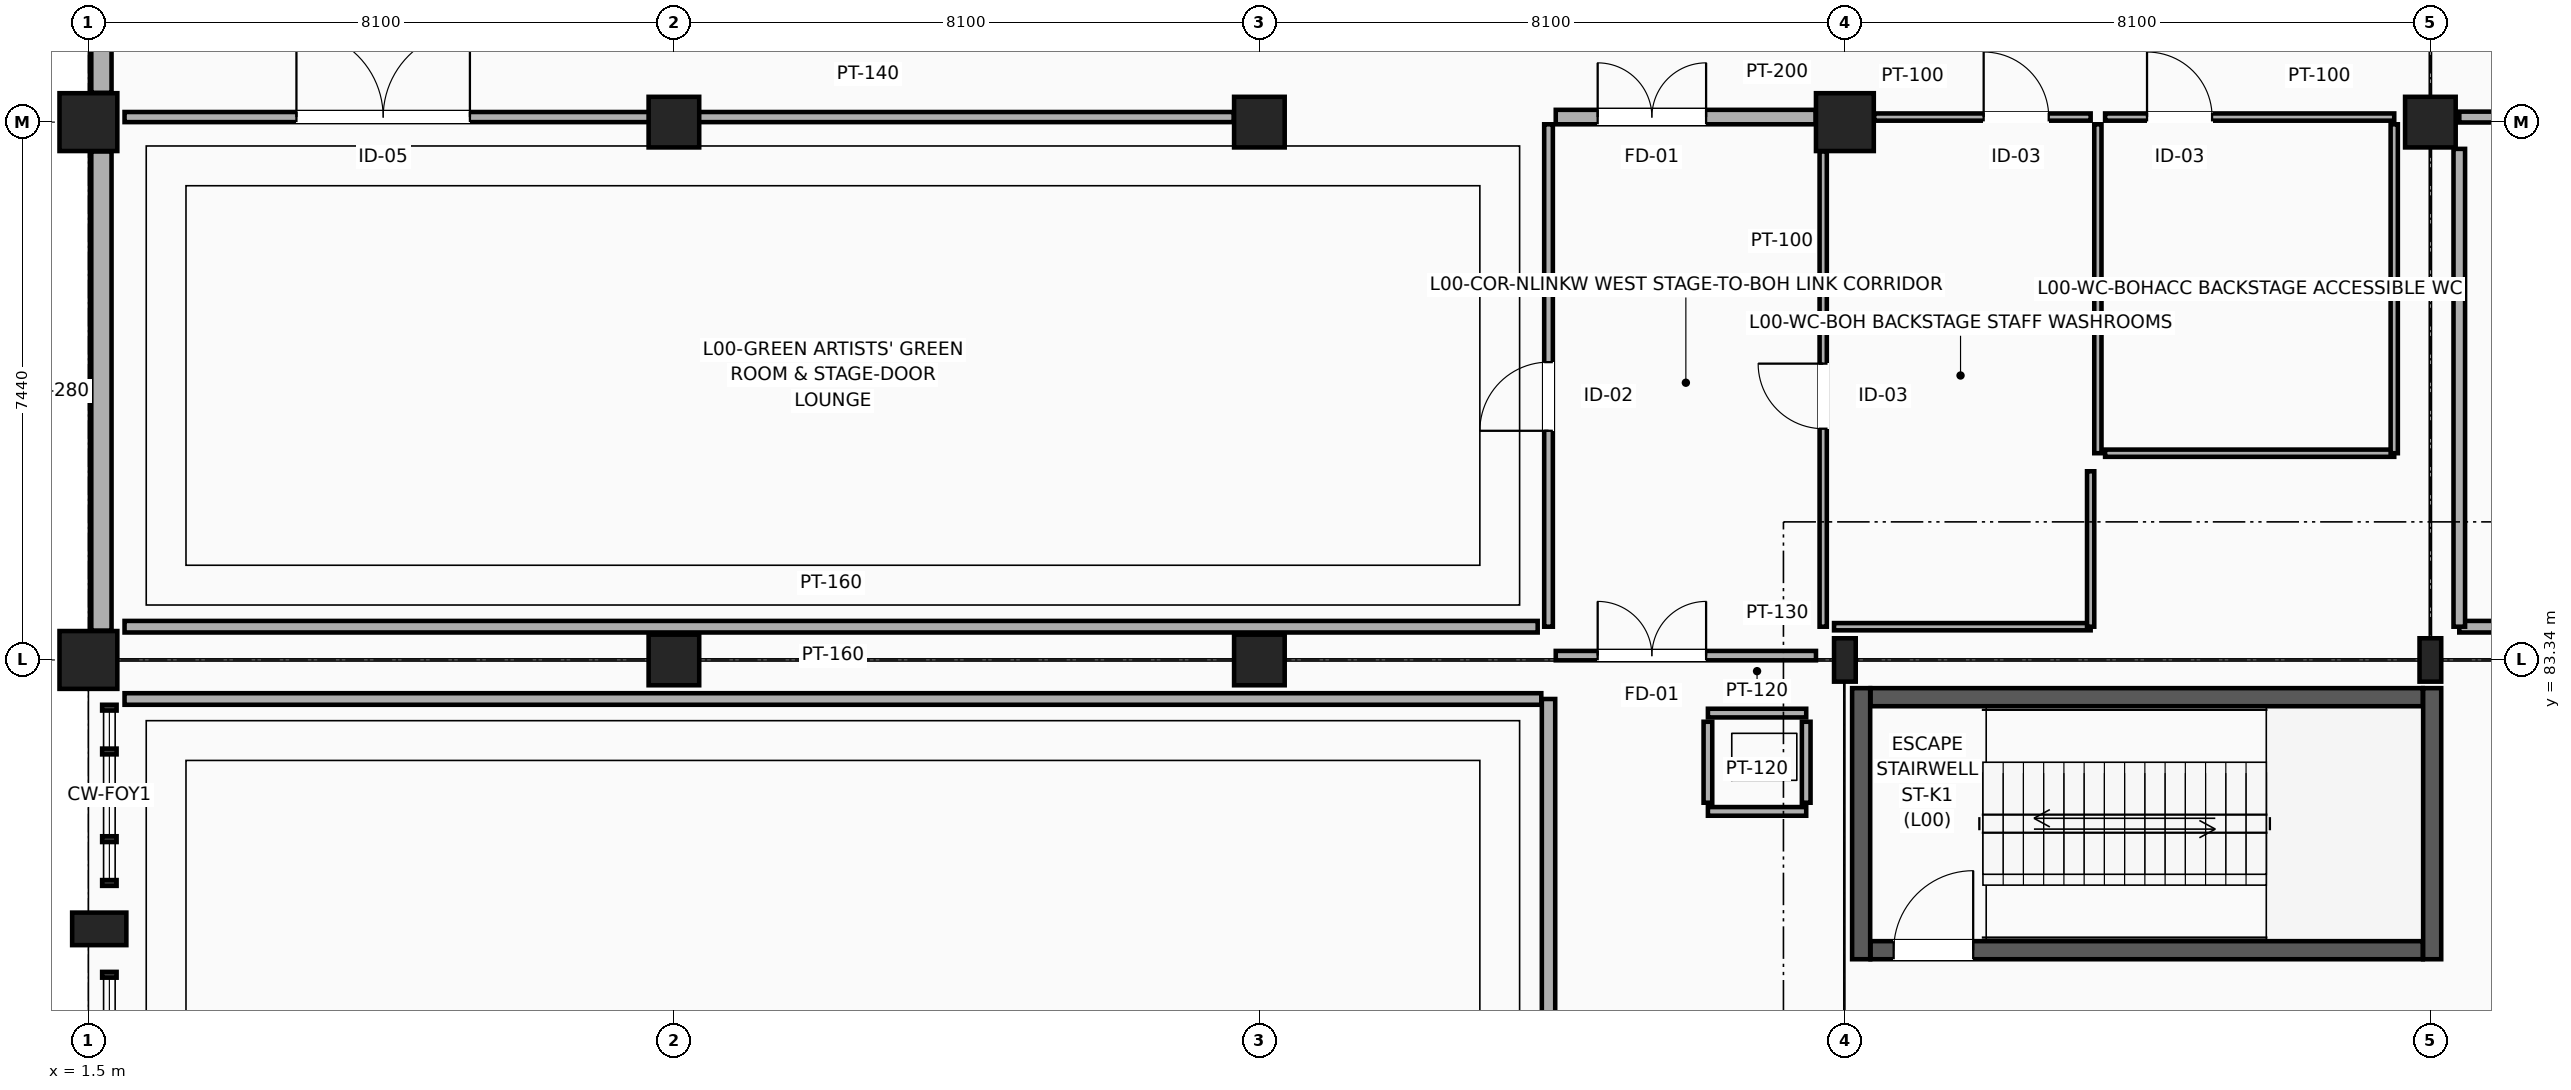
"""IFC4 building model, lengths in metres.
Left out: names, types, materials, properties, quantities, classifications, styles, units other than length and angle.
Written with IfcOpenShell. Run it as: python <this file> out.ifc"""

import sys

from ifc_helpers import new_model, si_unit, direction, frame, frame_2d, origin, origin_2d, place, context, subcontext, project, spatial, rectangle, i_section, extrude, element, fill, save


model = new_model("IFC4")
c1 = context("Model", 3, precision=1e-05, world=origin(), true_north=direction((0.0, 1.0)))
c2 = subcontext(c1, "Body", "Model", "MODEL_VIEW")
j1 = project(units=[si_unit("LENGTHUNIT", "METRE"), si_unit("PLANEANGLEUNIT", "RADIAN")], contexts=[c1])
p1 = place(None, origin())
s1 = spatial("IfcSite", under=j1, at=p1, CompositionType="ELEMENT")
p2 = place(p1, origin())
s2 = spatial("IfcBuilding", under=s1, at=p2, CompositionType="ELEMENT")
p3 = place(p2, origin())
s3 = spatial("IfcBuildingStorey", under=s2, at=p3, CompositionType="ELEMENT", Elevation=0.0)
p4 = place(p3, frame((1.65, 79.62, 0.0), z_axis=(0.0, 0.0, 1.0), x_axis=(0.0, 1.0, 0.0)))
e1 = element("IfcColumn", 1, at=p4, inside=s3, PredefinedType="PILASTER", context=c2, shape_type="SweptSolid", body=[
    extrude(rectangle(XDim=0.45, YDim=0.75, at=origin_2d()), origin(), (0.0, 0.0, 1.0), 5.4),
])
for number, where, z_axis, x_axis in (
    (2, (1.5, 83.34, 0.0), (0.0, 0.0, 1.0), (1.0, 0.0, 0.0)),
    (3, (1.5, 90.78, 0.0), (0.0, 0.0, 1.0), (1.0, 0.0, 0.0)),
):
    element("IfcColumn", number, at=place(p3, frame(where, z_axis=z_axis, x_axis=x_axis)), inside=s3, PredefinedType="COLUMN", context=c2, shape_type="SweptSolid", body=[
        extrude(rectangle(XDim=0.8, YDim=0.8, at=origin_2d()), origin(), (0.0, 0.0, 1.0), 5.4),
    ])
for number, where, z_axis, x_axis in (
    (4, (9.6, 83.34, 0.0), (0.0, 0.0, 1.0), (1.0, 0.0, 0.0)),
    (5, (9.6, 90.78, 0.0), (0.0, 0.0, 1.0), (1.0, 0.0, 0.0)),
    (6, (17.7, 83.34, 0.0), (0.0, 0.0, 1.0), (1.0, 0.0, 0.0)),
    (7, (17.7, 90.78, 0.0), (0.0, 0.0, 1.0), (1.0, 0.0, 0.0)),
):
    element("IfcColumn", number, at=place(p3, frame(where, z_axis=z_axis, x_axis=x_axis)), inside=s3, PredefinedType="COLUMN", context=c2, shape_type="SweptSolid", body=[
        extrude(rectangle(XDim=0.7, YDim=0.7, at=origin_2d()), origin(), (0.0, 0.0, 1.0), 5.4),
    ])
p5 = place(p3, frame((25.8, 83.34, 0.0), z_axis=(0.0, 0.0, 1.0), x_axis=(1.0, 0.0, 0.0)))
e8 = element("IfcColumn", 8, at=p5, inside=s3, PredefinedType="COLUMN", context=c2, shape_type="SweptSolid", body=[
    extrude(i_section(OverallWidth=0.3, OverallDepth=0.6, WebThickness=0.015, FlangeThickness=0.03, FilletRadius=0.027, at=origin_2d()), origin(), (0.0, 0.0, 1.0), 5.4),
])
p6 = place(p3, frame((25.8, 90.78, 0.0), z_axis=(0.0, 0.0, 1.0), x_axis=(1.0, 0.0, 0.0)))
e9 = element("IfcColumn", 9, at=p6, inside=s3, PredefinedType="COLUMN", context=c2, shape_type="SweptSolid", body=[
    extrude(rectangle(XDim=0.8, YDim=0.8, at=origin_2d()), origin(), (0.0, 0.0, 1.0), 5.4),
])
p7 = place(p3, frame((33.9, 83.34, 0.0), z_axis=(0.0, 0.0, 1.0), x_axis=(1.0, 0.0, 0.0)))
e10 = element("IfcColumn", 10, at=p7, inside=s3, PredefinedType="COLUMN", context=c2, shape_type="SweptSolid", body=[
    extrude(i_section(OverallWidth=0.3, OverallDepth=0.6, WebThickness=0.015, FlangeThickness=0.03, FilletRadius=0.027, at=origin_2d()), origin(), (0.0, 0.0, 1.0), 5.4),
])
p8 = place(p3, frame((33.9, 90.78, 0.0), z_axis=(0.0, 0.0, 1.0), x_axis=(1.0, 0.0, 0.0)))
e11 = element("IfcColumn", 11, at=p8, inside=s3, PredefinedType="COLUMN", context=c2, shape_type="SweptSolid", body=[
    extrude(rectangle(XDim=0.7, YDim=0.7, at=origin_2d()), origin(), (0.0, 0.0, 1.0), 5.4),
])
for number, where, z_axis, x_axis in (
    (12, (1.68, 83.745, 0.0), (0.0, 0.0, 1.0), (0.0, 1.0, 0.0)),
    (13, (1.68, 91.185, 0.0), (0.0, 0.0, 1.0), (0.0, 1.0, 0.0)),
):
    element("IfcWall", number, at=place(p3, frame(where, z_axis=z_axis, x_axis=x_axis)), inside=s3, PredefinedType="SOLIDWALL", context=c2, shape_type="SweptSolid", body=[
        extrude(rectangle(XDim=6.63, YDim=0.28, at=frame_2d((3.315, 0.0))), origin(), (0.0, 0.0, 1.0), 4.787),
    ])
p9 = place(p3, frame((26.155, 79.325, 0.0), z_axis=(0.0, 0.0, 1.0), x_axis=(1.0, 0.0, 0.0)))
e14 = element("IfcWall", 14, at=p9, inside=s3, PredefinedType="SHEAR", context=c2, shape_type="SweptSolid", body=[
    extrude(rectangle(XDim=7.64, YDim=0.25, at=frame_2d((3.82, 0.0))), origin(), (0.0, 0.0, 1.0), 5.105),
])
p10 = place(p9, frame((0.32, 0.0, 0.0)))
e15 = element("IfcOpeningElement", 15, at=p10, cuts=e14, PredefinedType="OPENING", context=c2, shape_type="SweptSolid", body=[
    extrude(rectangle(XDim=1.1, YDim=2.2, at=frame_2d((0.55, 1.1))), frame((0.0, 0.135, 0.0), z_axis=(0.0, -1.0, 0.0), x_axis=(1.0, 0.0, 0.0)), (0.0, 0.0, 1.0), 0.27),
])
p11 = place(p3, frame((26.155, 82.825, 0.0), z_axis=(0.0, 0.0, 1.0), x_axis=(1.0, 0.0, 0.0)))
e16 = element("IfcWall", 16, at=p11, inside=s3, PredefinedType="SHEAR", context=c2, shape_type="SweptSolid", body=[
    extrude(rectangle(XDim=7.64, YDim=0.25, at=frame_2d((3.82, 0.0))), origin(), (0.0, 0.0, 1.0), 5.105),
])
for number, where, z_axis, x_axis in (
    (17, (26.025, 79.2, 0.0), (0.0, 0.0, 1.0), (0.0, 1.0, 0.0)),
    (18, (33.925, 79.2, 0.0), (0.0, 0.0, 1.0), (0.0, 1.0, 0.0)),
):
    element("IfcWall", number, at=place(p3, frame(where, z_axis=z_axis, x_axis=x_axis)), inside=s3, PredefinedType="SHEAR", context=c2, shape_type="SweptSolid", body=[
        extrude(rectangle(XDim=3.75, YDim=0.25, at=frame_2d((1.875, 0.0))), origin(), (0.0, 0.0, 1.0), 5.105),
    ])
for number, where, z_axis, x_axis in (
    (19, (23.905, 81.245, 0.0), (0.0, 0.0, 1.0), (1.0, 0.0, 0.0)),
    (20, (23.905, 82.605, 0.0), (0.0, 0.0, 1.0), (1.0, 0.0, 0.0)),
):
    element("IfcWall", number, at=place(p3, frame(where, z_axis=z_axis, x_axis=x_axis)), inside=s3, PredefinedType="PARTITIONING", context=c2, shape_type="SweptSolid", body=[
        extrude(rectangle(XDim=1.36, YDim=0.12, at=frame_2d((0.68, 0.0))), origin(), (0.0, 0.0, 1.0), 5.085),
    ])
for number, where, z_axis, x_axis in (
    (21, (23.905, 81.365, 0.0), (0.0, 0.0, 1.0), (0.0, 1.0, 0.0)),
    (22, (25.265, 81.365, 0.0), (0.0, 0.0, 1.0), (0.0, 1.0, 0.0)),
):
    element("IfcWall", number, at=place(p3, frame(where, z_axis=z_axis, x_axis=x_axis)), inside=s3, PredefinedType="PARTITIONING", context=c2, shape_type="SweptSolid", body=[
        extrude(rectangle(XDim=1.12, YDim=0.12, at=frame_2d((0.56, 0.0))), origin(), (0.0, 0.0, 1.0), 5.085),
    ])
p12 = place(p3, frame((21.7, 64.7, 0.0), z_axis=(0.0, 0.0, 1.0), x_axis=(0.0, 1.0, 0.0)))
e23 = element("IfcWall", 23, at=p12, inside=s3, PredefinedType="PARTITIONING", context=c2, shape_type="SweptSolid", body=[
    extrude(rectangle(XDim=18.1, YDim=0.185, at=frame_2d((9.05, 0.0))), origin(), (0.0, 0.0, 1.0), 4.137),
])
p13 = place(p12, frame((6.936, 0.0, 0.0)))
e24 = element("IfcOpeningElement", 24, at=p13, cuts=e23, PredefinedType="OPENING", context=c2, shape_type="SweptSolid", body=[
    extrude(rectangle(XDim=1.05, YDim=2.25, at=frame_2d((0.525, 1.125))), frame((0.0, 0.103, 0.0), z_axis=(0.0, -1.0, 0.0), x_axis=(1.0, 0.0, 0.0)), (0.0, 0.0, 1.0), 0.205),
])
p14 = place(p3, frame((21.8, 83.4, 0.0), z_axis=(0.0, 0.0, 1.0), x_axis=(1.0, 0.0, 0.0)))
e25 = element("IfcWall", 25, at=p14, inside=s3, PredefinedType="PARTITIONING", context=c2, shape_type="SweptSolid", body=[
    extrude(rectangle(XDim=3.6, YDim=0.13, at=frame_2d((1.8, 0.0))), origin(), (0.0, 0.0, 1.0), 4.137),
])
p15 = place(p14, frame((0.58, 0.0, 0.0)))
e26 = element("IfcOpeningElement", 26, at=p15, cuts=e25, PredefinedType="OPENING", context=c2, shape_type="SweptSolid", body=[
    extrude(rectangle(XDim=1.5, YDim=2.2, at=frame_2d((0.75, 1.1))), frame((0.0, 0.075, 0.0), z_axis=(0.0, -1.0, 0.0), x_axis=(1.0, 0.0, 0.0)), (0.0, 0.0, 1.0), 0.15),
])
p16 = place(p3, frame((21.8, 90.85, 0.0), z_axis=(0.0, 0.0, 1.0), x_axis=(1.0, 0.0, 0.0)))
e27 = element("IfcWall", 27, at=p16, inside=s3, PredefinedType="PARTITIONING", context=c2, shape_type="SweptSolid", body=[
    extrude(rectangle(XDim=3.595, YDim=0.2, at=frame_2d((1.797, 0.0))), origin(), (0.0, 0.0, 1.0), 4.137),
])
p17 = place(p16, frame((0.58, 0.0, 0.0)))
e28 = element("IfcOpeningElement", 28, at=p17, cuts=e27, PredefinedType="OPENING", context=c2, shape_type="SweptSolid", body=[
    extrude(rectangle(XDim=1.5, YDim=2.2, at=frame_2d((0.75, 1.1))), frame((0.0, 0.11, 0.0), z_axis=(0.0, -1.0, 0.0), x_axis=(1.0, 0.0, 0.0)), (0.0, 0.0, 1.0), 0.22),
])
p18 = place(p3, frame((21.7, 83.8, 0.0), z_axis=(0.0, 0.0, 1.0), x_axis=(0.0, 1.0, 0.0)))
e29 = element("IfcWall", 29, at=p18, inside=s3, PredefinedType="PARTITIONING", context=c2, shape_type="SweptSolid", body=[
    extrude(rectangle(XDim=6.95, YDim=0.12, at=frame_2d((3.475, 0.0))), origin(), (0.0, 0.0, 1.0), 4.137),
])
p19 = place(p18, frame((2.71, 0.0, 0.0)))
e30 = element("IfcOpeningElement", 30, at=p19, cuts=e29, PredefinedType="OPENING", context=c2, shape_type="SweptSolid", body=[
    extrude(rectangle(XDim=0.95, YDim=2.15, at=frame_2d((0.475, 1.075))), frame((0.0, 0.07, 0.0), z_axis=(0.0, -1.0, 0.0), x_axis=(1.0, 0.0, 0.0)), (0.0, 0.0, 1.0), 0.14),
])
p20 = place(p3, frame((25.5, 83.8, 0.0), z_axis=(0.0, 0.0, 1.0), x_axis=(0.0, 1.0, 0.0)))
e31 = element("IfcWall", 31, at=p20, inside=s3, PredefinedType="PARTITIONING", context=c2, shape_type="SweptSolid", body=[
    extrude(rectangle(XDim=6.575, YDim=0.1, at=frame_2d((3.288, 0.0))), origin(), (0.0, 0.0, 1.0), 5.085),
])
p21 = place(p20, frame((2.739, 0.0, 0.0)))
e32 = element("IfcOpeningElement", 32, at=p21, cuts=e31, PredefinedType="OPENING", context=c2, shape_type="SweptSolid", body=[
    extrude(rectangle(XDim=0.9, YDim=2.1, at=frame_2d((0.45, 1.05))), frame((0.0, 0.06, 0.0), z_axis=(0.0, -1.0, 0.0), x_axis=(1.0, 0.0, 0.0)), (0.0, 0.0, 1.0), 0.12),
])
p22 = place(p3, frame((2.0, 90.85, 0.0), z_axis=(0.0, 0.0, 1.0), x_axis=(1.0, 0.0, 0.0)))
e33 = element("IfcWall", 33, at=p22, inside=s3, PredefinedType="PARTITIONING", context=c2, shape_type="SweptSolid", body=[
    extrude(rectangle(XDim=15.345, YDim=0.14, at=frame_2d((7.672, 0.0))), origin(), (0.0, 0.0, 1.0), 4.137),
])
p23 = place(p22, frame((2.378, 0.0, 0.0)))
e34 = element("IfcOpeningElement", 34, at=p23, cuts=e33, PredefinedType="OPENING", context=c2, shape_type="SweptSolid", body=[
    extrude(rectangle(XDim=2.4, YDim=2.8, at=frame_2d((1.2, 1.4))), frame((0.0, 0.08, 0.0), z_axis=(0.0, -1.0, 0.0), x_axis=(1.0, 0.0, 0.0)), (0.0, 0.0, 1.0), 0.16),
])
p24 = place(p3, frame((26.205, 90.85, 0.0), z_axis=(0.0, 0.0, 1.0), x_axis=(1.0, 0.0, 0.0)))
e35 = element("IfcWall", 35, at=p24, inside=s3, PredefinedType="PARTITIONING", context=c2, shape_type="SweptSolid", body=[
    extrude(rectangle(XDim=2.995, YDim=0.1, at=frame_2d((1.498, 0.0))), origin(), (0.0, 0.0, 1.0), 4.137),
])
p25 = place(p24, frame((1.515, 0.0, 0.0)))
e36 = element("IfcOpeningElement", 36, at=p25, cuts=e35, PredefinedType="OPENING", context=c2, shape_type="SweptSolid", body=[
    extrude(rectangle(XDim=0.9, YDim=2.1, at=frame_2d((0.45, 1.05))), frame((0.0, 0.06, 0.0), z_axis=(0.0, -1.0, 0.0), x_axis=(1.0, 0.0, 0.0)), (0.0, 0.0, 1.0), 0.12),
])
p26 = place(p3, frame((29.4, 90.85, 0.0), z_axis=(0.0, 0.0, 1.0), x_axis=(1.0, 0.0, 0.0)))
e37 = element("IfcWall", 37, at=p26, inside=s3, PredefinedType="PARTITIONING", context=c2, shape_type="SweptSolid", body=[
    extrude(rectangle(XDim=4.0, YDim=0.1, at=frame_2d((2.0, 0.0))), origin(), (0.0, 0.0, 1.0), 4.137),
])
p27 = place(p26, frame((0.58, 0.0, 0.0)))
e38 = element("IfcOpeningElement", 38, at=p27, cuts=e37, PredefinedType="OPENING", context=c2, shape_type="SweptSolid", body=[
    extrude(rectangle(XDim=0.9, YDim=2.1, at=frame_2d((0.45, 1.05))), frame((0.0, 0.06, 0.0), z_axis=(0.0, -1.0, 0.0), x_axis=(1.0, 0.0, 0.0)), (0.0, 0.0, 1.0), 0.12),
])
p28 = place(p3, frame((34.3, 90.85, 0.0), z_axis=(0.0, 0.0, 1.0), x_axis=(1.0, 0.0, 0.0)))
e39 = element("IfcWall", 39, at=p28, inside=s3, PredefinedType="MOVABLE", context=c2, shape_type="SweptSolid", body=[
    extrude(rectangle(XDim=15.395, YDim=0.15, at=frame_2d((7.698, 0.0))), origin(), (0.0, 0.0, 1.0), 4.137),
])
p29 = place(p28, frame((2.76, 0.0, 0.0)))
e40 = element("IfcOpeningElement", 40, at=p29, cuts=e39, PredefinedType="OPENING", context=c2, shape_type="SweptSolid", body=[
    extrude(rectangle(XDim=1.95, YDim=2.45, at=frame_2d((0.975, 1.225))), frame((0.0, 0.085, 0.0), z_axis=(0.0, -1.0, 0.0), x_axis=(1.0, 0.0, 0.0)), (0.0, 0.0, 1.0), 0.17),
])
p30 = place(p3, frame((29.3, 86.2, 0.0), z_axis=(0.0, 0.0, 1.0), x_axis=(0.0, 1.0, 0.0)))
e41 = element("IfcWall", 41, at=p30, inside=s3, PredefinedType="PARTITIONING", context=c2, shape_type="SweptSolid", body=[
    extrude(rectangle(XDim=4.55, YDim=0.1, at=frame_2d((2.275, 0.0))), origin(), (0.0, 0.0, 1.0), 4.137),
])
p31 = place(p3, frame((2.0, 82.8, 0.0), z_axis=(0.0, 0.0, 1.0), x_axis=(1.0, 0.0, 0.0)))
e42 = element("IfcWall", 42, at=p31, inside=s3, PredefinedType="PARTITIONING", context=c2, shape_type="SweptSolid", body=[
    extrude(rectangle(XDim=19.6, YDim=0.16, at=frame_2d((9.8, 0.0))), origin(), (0.0, 0.0, 1.0), 4.337),
])
p32 = place(p3, frame((2.0, 83.8, 0.0), z_axis=(0.0, 0.0, 1.0), x_axis=(1.0, 0.0, 0.0)))
e43 = element("IfcWall", 43, at=p32, inside=s3, PredefinedType="PARTITIONING", context=c2, shape_type="SweptSolid", body=[
    extrude(rectangle(XDim=19.55, YDim=0.16, at=frame_2d((9.775, 0.0))), origin(), (0.0, 0.0, 1.0), 4.337),
])
p33 = place(p3, frame((25.65, 83.8, 0.0), z_axis=(0.0, 0.0, 1.0), x_axis=(1.0, 0.0, 0.0)))
e44 = element("IfcWall", 44, at=p33, inside=s3, PredefinedType="PARTITIONING", context=c2, shape_type="SweptSolid", body=[
    extrude(rectangle(XDim=3.55, YDim=0.1, at=frame_2d((1.775, 0.0))), origin(), (0.0, 0.0, 1.0), 4.337),
])
p34 = place(p3, frame((29.2, 83.8, 0.0), z_axis=(0.0, 0.0, 1.0), x_axis=(0.0, 1.0, 0.0)))
e45 = element("IfcWall", 45, at=p34, inside=s3, PredefinedType="PARTITIONING", context=c2, shape_type="SweptSolid", body=[
    extrude(rectangle(XDim=2.15, YDim=0.1, at=frame_2d((1.075, 0.0))), origin(), (0.0, 0.0, 1.0), 5.085),
])
p35 = place(p3, frame((29.4, 86.2, 0.0), z_axis=(0.0, 0.0, 1.0), x_axis=(1.0, 0.0, 0.0)))
e46 = element("IfcWall", 46, at=p35, inside=s3, PredefinedType="PARTITIONING", context=c2, shape_type="SweptSolid", body=[
    extrude(rectangle(XDim=4.0, YDim=0.1, at=frame_2d((2.0, 0.0))), origin(), (0.0, 0.0, 1.0), 4.817),
])
p36 = place(p3, frame((33.4, 86.2, 0.0), z_axis=(0.0, 0.0, 1.0), x_axis=(0.0, 1.0, 0.0)))
e47 = element("IfcWall", 47, at=p36, inside=s3, PredefinedType="PARTITIONING", context=c2, shape_type="SweptSolid", body=[
    extrude(rectangle(XDim=4.55, YDim=0.1, at=frame_2d((2.275, 0.0))), origin(), (0.0, 0.0, 1.0), 4.137),
])
p37 = place(p3, frame((34.3, 83.8, 0.0), z_axis=(0.0, 0.0, 1.0), x_axis=(1.0, 0.0, 0.0)))
e48 = element("IfcWall", 48, at=p37, inside=s3, PredefinedType="PARTITIONING", context=c2, shape_type="SweptSolid", body=[
    extrude(rectangle(XDim=15.5, YDim=0.16, at=frame_2d((7.75, 0.0))), origin(), (0.0, 0.0, 1.0), 4.337),
])
p38 = place(p3, frame((34.3, 83.8, 0.0), z_axis=(0.0, 0.0, 1.0), x_axis=(0.0, 1.0, 0.0)))
e49 = element("IfcWall", 49, at=p38, inside=s3, PredefinedType="PARTITIONING", context=c2, shape_type="SweptSolid", body=[
    extrude(rectangle(XDim=6.61, YDim=0.16, at=frame_2d((3.305, 0.0))), origin(), (0.0, 0.0, 1.0), 5.085),
])
p39 = place(p10, origin())
e50 = element("IfcDoor", 50, at=p39, inside=s3, OperationType="SINGLE_SWING_RIGHT", PredefinedType="DOOR", context=c2, shape_type="SweptSolid", body=[
    extrude(rectangle(XDim=1.1, YDim=2.2, at=frame_2d((0.55, 1.1))), frame((0.0, 0.025, 0.0), z_axis=(0.0, -1.0, 0.0), x_axis=(1.0, 0.0, 0.0)), (0.0, 0.0, 1.0), 0.05),
])
fill(e15, e50)
p40 = place(p15, origin())
e51 = element("IfcDoor", 51, at=p40, inside=s3, OperationType="DOUBLE_DOOR_SINGLE_SWING", PredefinedType="DOOR", context=c2, shape_type="SweptSolid", body=[
    extrude(rectangle(XDim=1.5, YDim=2.2, at=frame_2d((0.75, 1.1))), frame((0.0, 0.025, 0.0), z_axis=(0.0, -1.0, 0.0), x_axis=(1.0, 0.0, 0.0)), (0.0, 0.0, 1.0), 0.05),
])
fill(e26, e51)
p41 = place(p17, origin())
e52 = element("IfcDoor", 52, at=p41, inside=s3, OperationType="DOUBLE_DOOR_SINGLE_SWING", PredefinedType="DOOR", context=c2, shape_type="SweptSolid", body=[
    extrude(rectangle(XDim=1.5, YDim=2.2, at=frame_2d((0.75, 1.1))), frame((0.0, 0.025, 0.0), z_axis=(0.0, -1.0, 0.0), x_axis=(1.0, 0.0, 0.0)), (0.0, 0.0, 1.0), 0.05),
])
fill(e28, e52)
p42 = place(p19, origin())
e53 = element("IfcDoor", 53, at=p42, inside=s3, OperationType="SINGLE_SWING_LEFT", PredefinedType="DOOR", context=c2, shape_type="SweptSolid", body=[
    extrude(rectangle(XDim=0.95, YDim=2.15, at=frame_2d((0.475, 1.075))), frame((0.0, 0.025, 0.0), z_axis=(0.0, -1.0, 0.0), x_axis=(1.0, 0.0, 0.0)), (0.0, 0.0, 1.0), 0.05),
])
fill(e30, e53)
p43 = place(p21, origin())
e54 = element("IfcDoor", 54, at=p43, inside=s3, OperationType="SINGLE_SWING_RIGHT", PredefinedType="DOOR", context=c2, shape_type="SweptSolid", body=[
    extrude(rectangle(XDim=0.9, YDim=2.1, at=frame_2d((0.45, 1.05))), frame((0.0, 0.025, 0.0), z_axis=(0.0, -1.0, 0.0), x_axis=(1.0, 0.0, 0.0)), (0.0, 0.0, 1.0), 0.05),
])
fill(e32, e54)
p44 = place(p23, origin())
e55 = element("IfcDoor", 55, at=p44, inside=s3, OperationType="DOUBLE_DOOR_SINGLE_SWING", PredefinedType="DOOR", context=c2, shape_type="SweptSolid", body=[
    extrude(rectangle(XDim=2.4, YDim=2.8, at=frame_2d((1.2, 1.4))), frame((0.0, 0.025, 0.0), z_axis=(0.0, -1.0, 0.0), x_axis=(1.0, 0.0, 0.0)), (0.0, 0.0, 1.0), 0.05),
])
fill(e34, e55)
p45 = place(p25, origin())
e56 = element("IfcDoor", 56, at=p45, inside=s3, OperationType="SINGLE_SWING_LEFT", PredefinedType="DOOR", context=c2, shape_type="SweptSolid", body=[
    extrude(rectangle(XDim=0.9, YDim=2.1, at=frame_2d((0.45, 1.05))), frame((0.0, 0.025, 0.0), z_axis=(0.0, -1.0, 0.0), x_axis=(1.0, 0.0, 0.0)), (0.0, 0.0, 1.0), 0.05),
])
fill(e36, e56)
p46 = place(p27, origin())
e57 = element("IfcDoor", 57, at=p46, inside=s3, OperationType="SINGLE_SWING_LEFT", PredefinedType="DOOR", context=c2, shape_type="SweptSolid", body=[
    extrude(rectangle(XDim=0.9, YDim=2.1, at=frame_2d((0.45, 1.05))), frame((0.0, 0.025, 0.0), z_axis=(0.0, -1.0, 0.0), x_axis=(1.0, 0.0, 0.0)), (0.0, 0.0, 1.0), 0.05),
])
fill(e38, e57)
save(model, sys.argv[1])
